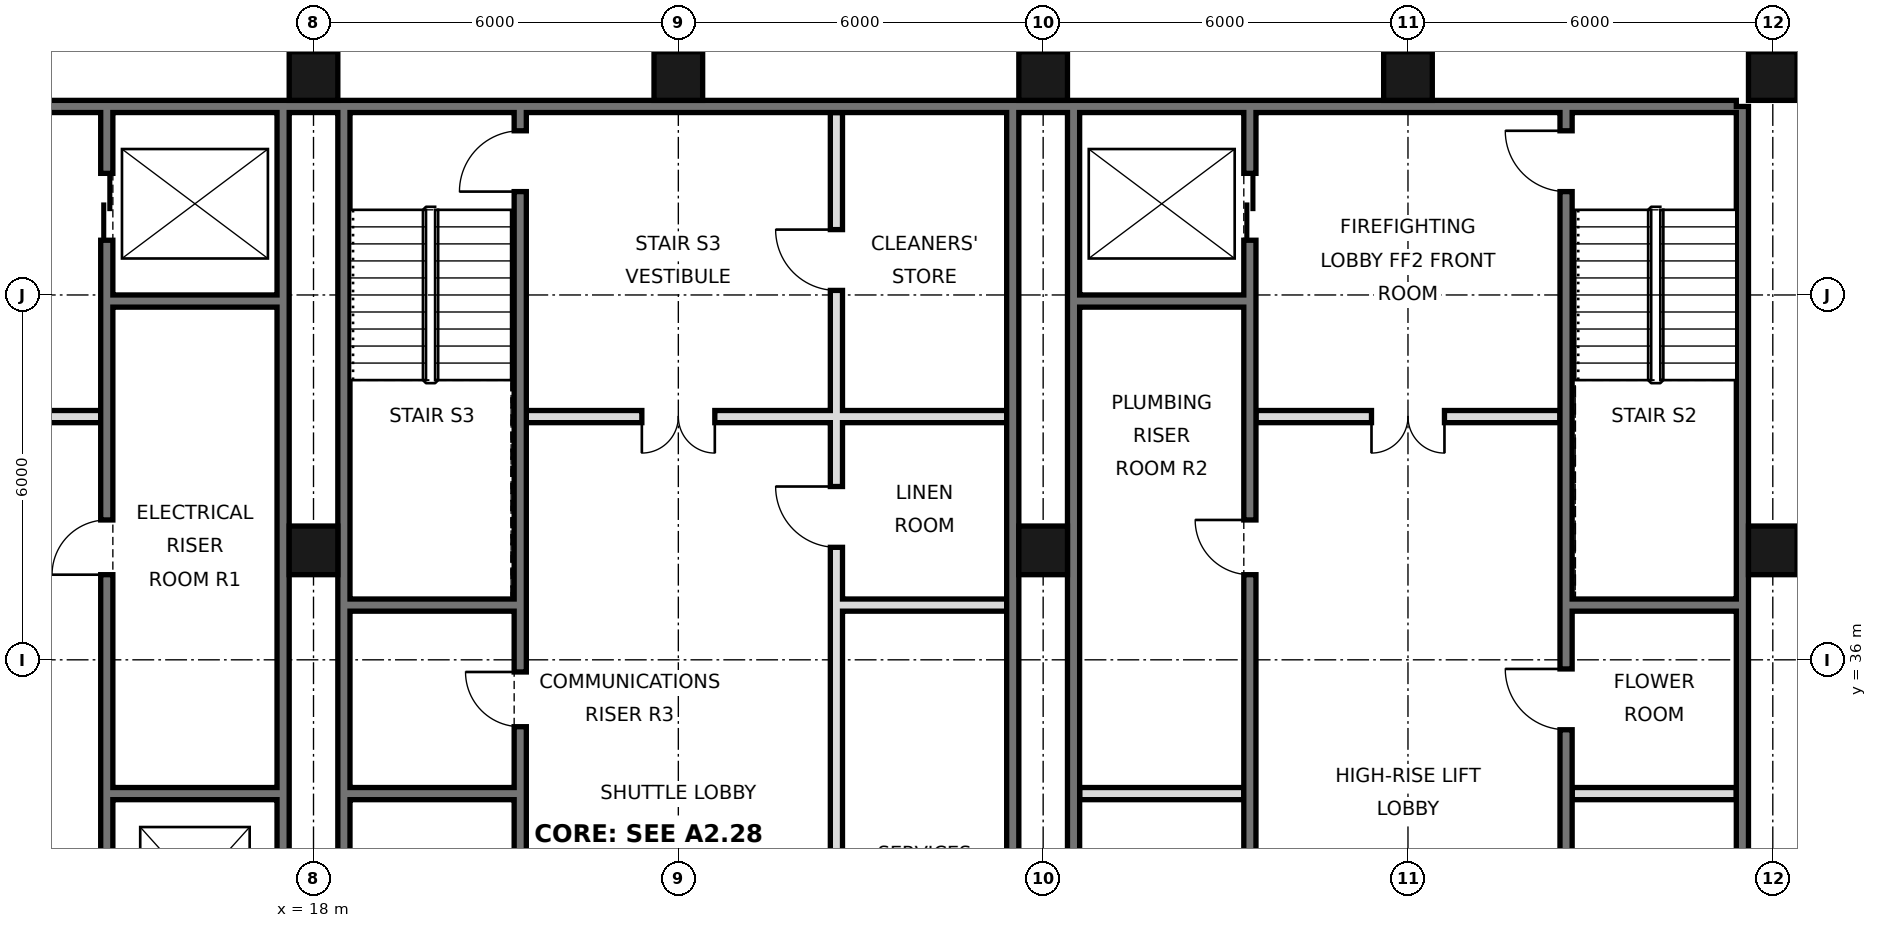
"""IFC4 building model, lengths in metres.
Left out: names, types, materials, properties, quantities, classifications, styles, units other than length and angle.
Written with IfcOpenShell. Run it as: python <this file> out.ifc"""

import sys

from ifc_helpers import new_model, si_unit, direction, frame, frame_2d, origin, origin_2d, place, context, subcontext, project, spatial, rectangle, hollow_rectangle, extrude, element, fill, save


model = new_model("IFC4")
c1 = context("Model", 3, precision=1e-05, world=origin(), true_north=direction((0.0, 1.0)))
c2 = subcontext(c1, "Body", "Model", "MODEL_VIEW")
j1 = project(units=[si_unit("LENGTHUNIT", "METRE"), si_unit("PLANEANGLEUNIT", "RADIAN")], contexts=[c1])
p1 = place(None, origin())
s1 = spatial("IfcSite", under=j1, at=p1, CompositionType="ELEMENT")
p2 = place(p1, origin())
s2 = spatial("IfcBuilding", under=s1, at=p2, CompositionType="ELEMENT")
p3 = place(p2, frame((0.0, 0.0, 110.6)))
s3 = spatial("IfcBuildingStorey", under=s2, at=p3, CompositionType="ELEMENT", Elevation=110.6)
for number, where, z_axis, x_axis in (
    (1, (18.0, 37.8, 0.0), (0.0, 0.0, 1.0), (1.0, 0.0, 0.0)),
    (2, (18.0, 45.6, 0.0), (0.0, 0.0, 1.0), (1.0, 0.0, 0.0)),
    (3, (24.0, 45.6, 0.0), (0.0, 0.0, 1.0), (1.0, 0.0, 0.0)),
    (4, (30.0, 37.8, 0.0), (0.0, 0.0, 1.0), (1.0, 0.0, 0.0)),
    (5, (30.0, 45.6, 0.0), (0.0, 0.0, 1.0), (1.0, 0.0, 0.0)),
    (6, (36.0, 45.6, 0.0), (0.0, 0.0, 1.0), (1.0, 0.0, 0.0)),
    (7, (42.0, 37.8, 0.0), (0.0, 0.0, 1.0), (1.0, 0.0, 0.0)),
    (8, (42.0, 45.6, 0.0), (0.0, 0.0, 1.0), (1.0, 0.0, 0.0)),
):
    element("IfcColumn", number, at=place(p3, frame(where, z_axis=z_axis, x_axis=x_axis)), inside=s3, PredefinedType="COLUMN", context=c2, shape_type="SweptSolid", body=[
        extrude(hollow_rectangle(XDim=0.8, YDim=0.8, WallThickness=0.05, at=origin_2d()), origin(), (0.0, 0.0, 1.0), 3.6),
    ])
p4 = place(p3, frame((41.5, 21.6, 0.0), z_axis=(0.0, 0.0, 1.0), x_axis=(0.0, 1.0, 0.0)))
e9 = element("IfcWall", 9, at=p4, inside=s3, PredefinedType="SOLIDWALL", context=c2, shape_type="SweptSolid", body=[
    extrude(rectangle(XDim=23.5, YDim=0.2, at=frame_2d((11.75, 0.0))), origin(), (0.0, 0.0, 1.0), 3.38),
])
p5 = place(p3, frame((6.6, 45.1, 0.0), z_axis=(0.0, 0.0, 1.0), x_axis=(1.0, 0.0, 0.0)))
e10 = element("IfcWall", 10, at=p5, inside=s3, PredefinedType="SOLIDWALL", context=c2, shape_type="SweptSolid", body=[
    extrude(rectangle(XDim=34.8, YDim=0.2, at=frame_2d((17.4, 0.0))), origin(), (0.0, 0.0, 1.0), 3.38),
])
for number, where, z_axis, x_axis in (
    (11, (17.5, 27.6, 0.0), (0.0, 0.0, 1.0), (0.0, 1.0, 0.0)),
    (12, (18.5, 27.6, 0.0), (0.0, 0.0, 1.0), (0.0, 1.0, 0.0)),
    (13, (29.5, 27.6, 0.0), (0.0, 0.0, 1.0), (0.0, 1.0, 0.0)),
    (14, (30.5, 27.6, 0.0), (0.0, 0.0, 1.0), (0.0, 1.0, 0.0)),
):
    element("IfcWall", number, at=place(p3, frame(where, z_axis=z_axis, x_axis=x_axis)), inside=s3, PredefinedType="SOLIDWALL", context=c2, shape_type="SweptSolid", body=[
        extrude(rectangle(XDim=17.5, YDim=0.2, at=frame_2d((8.75, 0.0))), origin(), (0.0, 0.0, 1.0), 3.38),
    ])
p6 = place(p3, frame((14.6, 27.5, 0.0), z_axis=(0.0, 0.0, 1.0), x_axis=(0.0, 1.0, 0.0)))
e15 = element("IfcWall", 15, at=p6, inside=s3, PredefinedType="SOLIDWALL", context=c2, shape_type="SweptSolid", body=[
    extrude(rectangle(XDim=17.5, YDim=0.2, at=frame_2d((8.75, 0.0))), origin(), (0.0, 0.0, 1.0), 3.38),
])
p7 = place(p6, frame((1.1, 0.0, 0.0)))
e16 = element("IfcOpeningElement", 16, at=p7, cuts=e15, PredefinedType="OPENING", context=c2, shape_type="SweptSolid", body=[
    extrude(rectangle(XDim=1.1, YDim=2.1, at=frame_2d((0.55, 1.05))), frame((0.0, 0.11, 0.0), z_axis=(0.0, -1.0, 0.0), x_axis=(1.0, 0.0, 0.0)), (0.0, 0.0, 1.0), 0.22),
])
p8 = place(p6, frame((4.2, 0.0, 0.0)))
e17 = element("IfcOpeningElement", 17, at=p8, cuts=e15, PredefinedType="OPENING", context=c2, shape_type="SweptSolid", body=[
    extrude(rectangle(XDim=1.1, YDim=2.1, at=frame_2d((0.55, 1.05))), frame((0.0, 0.11, 0.0), z_axis=(0.0, -1.0, 0.0), x_axis=(1.0, 0.0, 0.0)), (0.0, 0.0, 1.0), 0.22),
])
p9 = place(p6, frame((15.4, 0.0, 0.0)))
e18 = element("IfcOpeningElement", 18, at=p9, cuts=e15, PredefinedType="OPENING", context=c2, shape_type="SweptSolid", body=[
    extrude(rectangle(XDim=1.1, YDim=2.1, at=frame_2d((0.55, 1.05))), frame((0.0, 0.11, 0.0), z_axis=(0.0, -1.0, 0.0), x_axis=(1.0, 0.0, 0.0)), (0.0, 0.0, 1.0), 0.22),
])
p10 = place(p6, frame((9.9, 0.0, 0.0)))
e19 = element("IfcOpeningElement", 19, at=p10, cuts=e15, PredefinedType="OPENING", context=c2, shape_type="SweptSolid", body=[
    extrude(rectangle(XDim=0.9, YDim=2.1, at=frame_2d((0.45, 1.05))), frame((0.0, 0.11, 0.0), z_axis=(0.0, -1.0, 0.0), x_axis=(1.0, 0.0, 0.0)), (0.0, 0.0, 1.0), 0.22),
])
p11 = place(p3, frame((21.4, 27.5, 0.0), z_axis=(0.0, 0.0, 1.0), x_axis=(0.0, 1.0, 0.0)))
e20 = element("IfcWall", 20, at=p11, inside=s3, PredefinedType="SOLIDWALL", context=c2, shape_type="SweptSolid", body=[
    extrude(rectangle(XDim=17.5, YDim=0.2, at=frame_2d((8.75, 0.0))), origin(), (0.0, 0.0, 1.0), 3.38),
])
p12 = place(p11, frame((16.2, 0.0, 0.0)))
e21 = element("IfcOpeningElement", 21, at=p12, cuts=e20, PredefinedType="OPENING", context=c2, shape_type="SweptSolid", body=[
    extrude(rectangle(XDim=1.0, YDim=2.1, at=frame_2d((0.5, 1.05))), frame((0.0, 0.11, 0.0), z_axis=(0.0, -1.0, 0.0), x_axis=(1.0, 0.0, 0.0)), (0.0, 0.0, 1.0), 0.22),
])
p13 = place(p11, frame((7.4, 0.0, 0.0)))
e22 = element("IfcOpeningElement", 22, at=p13, cuts=e20, PredefinedType="OPENING", context=c2, shape_type="SweptSolid", body=[
    extrude(rectangle(XDim=0.9, YDim=2.1, at=frame_2d((0.45, 1.05))), frame((0.0, 0.11, 0.0), z_axis=(0.0, -1.0, 0.0), x_axis=(1.0, 0.0, 0.0)), (0.0, 0.0, 1.0), 0.22),
])
p14 = place(p3, frame((26.6, 27.5, 0.0), z_axis=(0.0, 0.0, 1.0), x_axis=(0.0, 1.0, 0.0)))
e23 = element("IfcWall", 23, at=p14, inside=s3, PredefinedType="SOLIDWALL", context=c2, shape_type="SweptSolid", body=[
    extrude(rectangle(XDim=17.5, YDim=0.2, at=frame_2d((8.75, 0.0))), origin(), (0.0, 0.0, 1.0), 3.38),
])
p15 = place(p14, frame((4.3, 0.0, 0.0)))
e24 = element("IfcOpeningElement", 24, at=p15, cuts=e23, PredefinedType="OPENING", context=c2, shape_type="SweptSolid", body=[
    extrude(rectangle(XDim=0.9, YDim=2.1, at=frame_2d((0.45, 1.05))), frame((0.0, 0.11, 0.0), z_axis=(0.0, -1.0, 0.0), x_axis=(1.0, 0.0, 0.0)), (0.0, 0.0, 1.0), 0.22),
])
p16 = place(p14, frame((10.35, 0.0, 0.0)))
e25 = element("IfcOpeningElement", 25, at=p16, cuts=e23, PredefinedType="OPENING", context=c2, shape_type="SweptSolid", body=[
    extrude(rectangle(XDim=1.0, YDim=2.1, at=frame_2d((0.5, 1.05))), frame((0.0, 0.11, 0.0), z_axis=(0.0, -1.0, 0.0), x_axis=(1.0, 0.0, 0.0)), (0.0, 0.0, 1.0), 0.22),
])
p17 = place(p14, frame((14.575, 0.0, 0.0)))
e26 = element("IfcOpeningElement", 26, at=p17, cuts=e23, PredefinedType="OPENING", context=c2, shape_type="SweptSolid", body=[
    extrude(rectangle(XDim=1.0, YDim=2.1, at=frame_2d((0.5, 1.05))), frame((0.0, 0.11, 0.0), z_axis=(0.0, -1.0, 0.0), x_axis=(1.0, 0.0, 0.0)), (0.0, 0.0, 1.0), 0.22),
])
p18 = place(p3, frame((33.4, 27.5, 0.0), z_axis=(0.0, 0.0, 1.0), x_axis=(0.0, 1.0, 0.0)))
e27 = element("IfcWall", 27, at=p18, inside=s3, PredefinedType="SOLIDWALL", context=c2, shape_type="SweptSolid", body=[
    extrude(rectangle(XDim=17.5, YDim=0.2, at=frame_2d((8.75, 0.0))), origin(), (0.0, 0.0, 1.0), 3.38),
])
p19 = place(p18, frame((15.4, 0.0, 0.0)))
e28 = element("IfcOpeningElement", 28, at=p19, cuts=e27, PredefinedType="OPENING", context=c2, shape_type="SweptSolid", body=[
    extrude(rectangle(XDim=1.1, YDim=2.1, at=frame_2d((0.55, 1.05))), frame((0.0, 0.11, 0.0), z_axis=(0.0, -1.0, 0.0), x_axis=(1.0, 0.0, 0.0)), (0.0, 0.0, 1.0), 0.22),
])
p20 = place(p18, frame((2.7, 0.0, 0.0)))
e29 = element("IfcOpeningElement", 29, at=p20, cuts=e27, PredefinedType="OPENING", context=c2, shape_type="SweptSolid", body=[
    extrude(rectangle(XDim=1.0, YDim=2.1, at=frame_2d((0.5, 1.05))), frame((0.0, 0.11, 0.0), z_axis=(0.0, -1.0, 0.0), x_axis=(1.0, 0.0, 0.0)), (0.0, 0.0, 1.0), 0.22),
])
p21 = place(p18, frame((9.9, 0.0, 0.0)))
e30 = element("IfcOpeningElement", 30, at=p21, cuts=e27, PredefinedType="OPENING", context=c2, shape_type="SweptSolid", body=[
    extrude(rectangle(XDim=0.9, YDim=2.1, at=frame_2d((0.45, 1.05))), frame((0.0, 0.11, 0.0), z_axis=(0.0, -1.0, 0.0), x_axis=(1.0, 0.0, 0.0)), (0.0, 0.0, 1.0), 0.22),
])
p22 = place(p3, frame((38.6, 21.6, 0.0), z_axis=(0.0, 0.0, 1.0), x_axis=(0.0, 1.0, 0.0)))
e31 = element("IfcWall", 31, at=p22, inside=s3, PredefinedType="SOLIDWALL", context=c2, shape_type="SweptSolid", body=[
    extrude(rectangle(XDim=23.4, YDim=0.2, at=frame_2d((11.7, 0.0))), origin(), (0.0, 0.0, 1.0), 3.38),
])
p23 = place(p22, frame((8.6, 0.0, 0.0)))
e32 = element("IfcOpeningElement", 32, at=p23, cuts=e31, PredefinedType="OPENING", context=c2, shape_type="SweptSolid", body=[
    extrude(rectangle(XDim=1.0, YDim=2.1, at=frame_2d((0.5, 1.05))), frame((0.0, 0.11, 0.0), z_axis=(0.0, -1.0, 0.0), x_axis=(1.0, 0.0, 0.0)), (0.0, 0.0, 1.0), 0.22),
])
p24 = place(p22, frame((13.25, 0.0, 0.0)))
e33 = element("IfcOpeningElement", 33, at=p24, cuts=e31, PredefinedType="OPENING", context=c2, shape_type="SweptSolid", body=[
    extrude(rectangle(XDim=1.0, YDim=2.1, at=frame_2d((0.5, 1.05))), frame((0.0, 0.11, 0.0), z_axis=(0.0, -1.0, 0.0), x_axis=(1.0, 0.0, 0.0)), (0.0, 0.0, 1.0), 0.22),
])
p25 = place(p22, frame((22.1, 0.0, 0.0)))
e34 = element("IfcOpeningElement", 34, at=p25, cuts=e31, PredefinedType="OPENING", context=c2, shape_type="SweptSolid", body=[
    extrude(rectangle(XDim=1.0, YDim=2.1, at=frame_2d((0.5, 1.05))), frame((0.0, 0.11, 0.0), z_axis=(0.0, -1.0, 0.0), x_axis=(1.0, 0.0, 0.0)), (0.0, 0.0, 1.0), 0.22),
])
p26 = place(p22, frame((0.175, 0.0, 0.0)))
e35 = element("IfcOpeningElement", 35, at=p26, cuts=e31, PredefinedType="OPENING", context=c2, shape_type="SweptSolid", body=[
    extrude(rectangle(XDim=0.9, YDim=2.1, at=frame_2d((0.45, 1.05))), frame((0.0, 0.11, 0.0), z_axis=(0.0, -1.0, 0.0), x_axis=(1.0, 0.0, 0.0)), (0.0, 0.0, 1.0), 0.22),
])
for number, where, z_axis, x_axis in (
    (36, (14.7, 33.8, 0.0), (0.0, 0.0, 1.0), (1.0, 0.0, 0.0)),
    (37, (18.6, 33.8, 0.0), (0.0, 0.0, 1.0), (1.0, 0.0, 0.0)),
    (38, (30.6, 33.8, 0.0), (0.0, 0.0, 1.0), (1.0, 0.0, 0.0)),
):
    element("IfcWall", number, at=place(p3, frame(where, z_axis=z_axis, x_axis=x_axis)), inside=s3, PredefinedType="SOLIDWALL", context=c2, shape_type="SweptSolid", body=[
        extrude(rectangle(XDim=2.7, YDim=0.2, at=frame_2d((1.35, 0.0))), origin(), (0.0, 0.0, 1.0), 3.38),
    ])
p27 = place(p3, frame((38.7, 33.8, 0.0), z_axis=(0.0, 0.0, 1.0), x_axis=(1.0, 0.0, 0.0)))
e39 = element("IfcWall", 39, at=p27, inside=s3, PredefinedType="PARTITIONING", context=c2, shape_type="SweptSolid", body=[
    extrude(rectangle(XDim=2.7, YDim=0.2, at=frame_2d((1.35, 0.0))), origin(), (0.0, 0.0, 1.0), 3.38),
])
for number, where, z_axis, x_axis in (
    (40, (18.6, 36.9, 0.0), (0.0, 0.0, 1.0), (1.0, 0.0, 0.0)),
    (41, (26.7, 36.9, 0.0), (0.0, 0.0, 1.0), (1.0, 0.0, 0.0)),
    (42, (38.7, 36.9, 0.0), (0.0, 0.0, 1.0), (1.0, 0.0, 0.0)),
):
    element("IfcWall", number, at=place(p3, frame(where, z_axis=z_axis, x_axis=x_axis)), inside=s3, PredefinedType="SOLIDWALL", context=c2, shape_type="SweptSolid", body=[
        extrude(rectangle(XDim=2.7, YDim=0.2, at=frame_2d((1.35, 0.0))), origin(), (0.0, 0.0, 1.0), 3.38),
    ])
p28 = place(p3, frame((21.5, 40.0, 0.0), z_axis=(0.0, 0.0, 1.0), x_axis=(1.0, 0.0, 0.0)))
e43 = element("IfcWall", 43, at=p28, inside=s3, PredefinedType="PARTITIONING", context=c2, shape_type="SweptSolid", body=[
    extrude(rectangle(XDim=7.9, YDim=0.2, at=frame_2d((3.95, 0.0))), origin(), (0.0, 0.0, 1.0), 3.38),
])
p29 = place(p28, frame((1.9, 0.0, 0.0)))
e44 = element("IfcOpeningElement", 44, at=p29, cuts=e43, PredefinedType="OPENING", context=c2, shape_type="SweptSolid", body=[
    extrude(rectangle(XDim=1.2, YDim=2.1, at=frame_2d((0.6, 1.05))), frame((0.0, 0.11, 0.0), z_axis=(0.0, -1.0, 0.0), x_axis=(1.0, 0.0, 0.0)), (0.0, 0.0, 1.0), 0.22),
])
p30 = place(p3, frame((33.5, 40.0, 0.0), z_axis=(0.0, 0.0, 1.0), x_axis=(1.0, 0.0, 0.0)))
e45 = element("IfcWall", 45, at=p30, inside=s3, PredefinedType="PARTITIONING", context=c2, shape_type="SweptSolid", body=[
    extrude(rectangle(XDim=5.0, YDim=0.2, at=frame_2d((2.5, 0.0))), origin(), (0.0, 0.0, 1.0), 3.38),
])
p31 = place(p30, frame((1.9, 0.0, 0.0)))
e46 = element("IfcOpeningElement", 46, at=p31, cuts=e45, PredefinedType="OPENING", context=c2, shape_type="SweptSolid", body=[
    extrude(rectangle(XDim=1.2, YDim=2.1, at=frame_2d((0.6, 1.05))), frame((0.0, 0.11, 0.0), z_axis=(0.0, -1.0, 0.0), x_axis=(1.0, 0.0, 0.0)), (0.0, 0.0, 1.0), 0.22),
])
p32 = place(p3, frame((9.5, 40.0, 0.0), z_axis=(0.0, 0.0, 1.0), x_axis=(1.0, 0.0, 0.0)))
e47 = element("IfcWall", 47, at=p32, inside=s3, PredefinedType="PARTITIONING", context=c2, shape_type="SweptSolid", body=[
    extrude(rectangle(XDim=5.0, YDim=0.2, at=frame_2d((2.5, 0.0))), origin(), (0.0, 0.0, 1.0), 3.38),
])
p33 = place(p32, frame((1.9, 0.0, 0.0)))
e48 = element("IfcOpeningElement", 48, at=p33, cuts=e47, PredefinedType="OPENING", context=c2, shape_type="SweptSolid", body=[
    extrude(rectangle(XDim=1.2, YDim=2.1, at=frame_2d((0.6, 1.05))), frame((0.0, 0.11, 0.0), z_axis=(0.0, -1.0, 0.0), x_axis=(1.0, 0.0, 0.0)), (0.0, 0.0, 1.0), 0.22),
])
for number, where, z_axis, x_axis in (
    (49, (14.7, 41.9, 0.0), (0.0, 0.0, 1.0), (1.0, 0.0, 0.0)),
    (50, (30.6, 41.9, 0.0), (0.0, 0.0, 1.0), (1.0, 0.0, 0.0)),
):
    element("IfcWall", number, at=place(p3, frame(where, z_axis=z_axis, x_axis=x_axis)), inside=s3, PredefinedType="SOLIDWALL", context=c2, shape_type="SweptSolid", body=[
        extrude(rectangle(XDim=2.7, YDim=0.2, at=frame_2d((1.35, 0.0))), origin(), (0.0, 0.0, 1.0), 3.38),
    ])
p34 = place(p29, frame((1.2, 0.0, 0.0), z_axis=(0.0, 0.0, 1.0), x_axis=(-1.0, 0.0, 0.0)))
e51 = element("IfcDoor", 51, at=p34, inside=s3, OperationType="DOUBLE_DOOR_SINGLE_SWING", PredefinedType="DOOR", context=c2, shape_type="SweptSolid", body=[
    extrude(rectangle(XDim=1.2, YDim=2.1, at=frame_2d((0.6, 1.05))), frame((0.0, 0.025, 0.0), z_axis=(0.0, -1.0, 0.0), x_axis=(1.0, 0.0, 0.0)), (0.0, 0.0, 1.0), 0.05),
])
fill(e44, e51)
p35 = place(p31, frame((1.2, 0.0, 0.0), z_axis=(0.0, 0.0, 1.0), x_axis=(-1.0, 0.0, 0.0)))
e52 = element("IfcDoor", 52, at=p35, inside=s3, OperationType="DOUBLE_DOOR_SINGLE_SWING", PredefinedType="DOOR", context=c2, shape_type="SweptSolid", body=[
    extrude(rectangle(XDim=1.2, YDim=2.1, at=frame_2d((0.6, 1.05))), frame((0.0, 0.025, 0.0), z_axis=(0.0, -1.0, 0.0), x_axis=(1.0, 0.0, 0.0)), (0.0, 0.0, 1.0), 0.05),
])
fill(e46, e52)
p36 = place(p19, origin())
e53 = element("IfcDoor", 53, at=p36, inside=s3, OperationType="DOUBLE_DOOR_SLIDING", PredefinedType="DOOR", context=c2, shape_type="SweptSolid", body=[
    extrude(rectangle(XDim=1.1, YDim=2.1, at=frame_2d((0.55, 1.05))), frame((0.0, 0.025, 0.0), z_axis=(0.0, -1.0, 0.0), x_axis=(1.0, 0.0, 0.0)), (0.0, 0.0, 1.0), 0.05),
])
fill(e28, e53)
p37 = place(p9, origin())
e54 = element("IfcDoor", 54, at=p37, inside=s3, OperationType="DOUBLE_DOOR_SLIDING", PredefinedType="DOOR", context=c2, shape_type="SweptSolid", body=[
    extrude(rectangle(XDim=1.1, YDim=2.1, at=frame_2d((0.55, 1.05))), frame((0.0, 0.025, 0.0), z_axis=(0.0, -1.0, 0.0), x_axis=(1.0, 0.0, 0.0)), (0.0, 0.0, 1.0), 0.05),
])
fill(e18, e54)
p38 = place(p24, frame((1.0, 0.0, 0.0), z_axis=(0.0, 0.0, 1.0), x_axis=(-1.0, 0.0, 0.0)))
e55 = element("IfcDoor", 55, at=p38, inside=s3, OperationType="SINGLE_SWING_LEFT", PredefinedType="DOOR", context=c2, shape_type="SweptSolid", body=[
    extrude(rectangle(XDim=1.0, YDim=2.1, at=frame_2d((0.5, 1.05))), frame((0.0, 0.025, 0.0), z_axis=(0.0, -1.0, 0.0), x_axis=(1.0, 0.0, 0.0)), (0.0, 0.0, 1.0), 0.05),
])
fill(e33, e55)
p39 = place(p25, frame((1.0, 0.0, 0.0), z_axis=(0.0, 0.0, 1.0), x_axis=(-1.0, 0.0, 0.0)))
e56 = element("IfcDoor", 56, at=p39, inside=s3, OperationType="SINGLE_SWING_LEFT", PredefinedType="DOOR", context=c2, shape_type="SweptSolid", body=[
    extrude(rectangle(XDim=1.0, YDim=2.1, at=frame_2d((0.5, 1.05))), frame((0.0, 0.025, 0.0), z_axis=(0.0, -1.0, 0.0), x_axis=(1.0, 0.0, 0.0)), (0.0, 0.0, 1.0), 0.05),
])
fill(e34, e56)
p40 = place(p12, origin())
e57 = element("IfcDoor", 57, at=p40, inside=s3, OperationType="SINGLE_SWING_LEFT", PredefinedType="DOOR", context=c2, shape_type="SweptSolid", body=[
    extrude(rectangle(XDim=1.0, YDim=2.1, at=frame_2d((0.5, 1.05))), frame((0.0, 0.025, 0.0), z_axis=(0.0, -1.0, 0.0), x_axis=(1.0, 0.0, 0.0)), (0.0, 0.0, 1.0), 0.05),
])
fill(e21, e57)
p41 = place(p10, origin())
e58 = element("IfcDoor", 58, at=p41, inside=s3, OperationType="SINGLE_SWING_LEFT", PredefinedType="DOOR", context=c2, shape_type="SweptSolid", body=[
    extrude(rectangle(XDim=0.9, YDim=2.1, at=frame_2d((0.45, 1.05))), frame((0.0, 0.025, 0.0), z_axis=(0.0, -1.0, 0.0), x_axis=(1.0, 0.0, 0.0)), (0.0, 0.0, 1.0), 0.05),
])
fill(e19, e58)
p42 = place(p21, frame((0.9, 0.0, 0.0), z_axis=(0.0, 0.0, 1.0), x_axis=(-1.0, 0.0, 0.0)))
e59 = element("IfcDoor", 59, at=p42, inside=s3, OperationType="SINGLE_SWING_LEFT", PredefinedType="DOOR", context=c2, shape_type="SweptSolid", body=[
    extrude(rectangle(XDim=0.9, YDim=2.1, at=frame_2d((0.45, 1.05))), frame((0.0, 0.025, 0.0), z_axis=(0.0, -1.0, 0.0), x_axis=(1.0, 0.0, 0.0)), (0.0, 0.0, 1.0), 0.05),
])
fill(e30, e59)
p43 = place(p13, frame((0.9, 0.0, 0.0), z_axis=(0.0, 0.0, 1.0), x_axis=(-1.0, 0.0, 0.0)))
e60 = element("IfcDoor", 60, at=p43, inside=s3, OperationType="SINGLE_SWING_LEFT", PredefinedType="DOOR", context=c2, shape_type="SweptSolid", body=[
    extrude(rectangle(XDim=0.9, YDim=2.1, at=frame_2d((0.45, 1.05))), frame((0.0, 0.025, 0.0), z_axis=(0.0, -1.0, 0.0), x_axis=(1.0, 0.0, 0.0)), (0.0, 0.0, 1.0), 0.05),
])
fill(e22, e60)
p44 = place(p16, frame((1.0, 0.0, 0.0), z_axis=(0.0, 0.0, 1.0), x_axis=(-1.0, 0.0, 0.0)))
e61 = element("IfcDoor", 61, at=p44, inside=s3, OperationType="SINGLE_SWING_LEFT", PredefinedType="DOOR", context=c2, shape_type="SweptSolid", body=[
    extrude(rectangle(XDim=1.0, YDim=2.1, at=frame_2d((0.5, 1.05))), frame((0.0, 0.025, 0.0), z_axis=(0.0, -1.0, 0.0), x_axis=(1.0, 0.0, 0.0)), (0.0, 0.0, 1.0), 0.05),
])
fill(e25, e61)
p45 = place(p17, frame((1.0, 0.0, 0.0), z_axis=(0.0, 0.0, 1.0), x_axis=(-1.0, 0.0, 0.0)))
e62 = element("IfcDoor", 62, at=p45, inside=s3, OperationType="SINGLE_SWING_LEFT", PredefinedType="DOOR", context=c2, shape_type="SweptSolid", body=[
    extrude(rectangle(XDim=1.0, YDim=2.1, at=frame_2d((0.5, 1.05))), frame((0.0, 0.025, 0.0), z_axis=(0.0, -1.0, 0.0), x_axis=(1.0, 0.0, 0.0)), (0.0, 0.0, 1.0), 0.05),
])
fill(e26, e62)
save(model, sys.argv[1])
